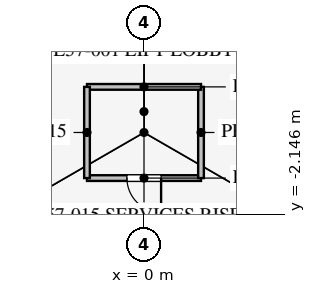
"""IFC4 building model, lengths in metres.
Left out: names, types, materials, properties, quantities, classifications, styles, units other than length and angle.
Written with IfcOpenShell. Run it as: python <this file> out.ifc"""

import sys

from ifc_helpers import new_model, si_unit, direction, frame, frame_2d, origin, place, context, subcontext, project, spatial, rectangle, extrude, element, fill, save


model = new_model("IFC4")
c1 = context("Model", 3, precision=1e-05, world=origin(), true_north=direction((0.0, 1.0)))
c2 = subcontext(c1, "Body", "Model", "MODEL_VIEW")
j1 = project(units=[si_unit("LENGTHUNIT", "METRE"), si_unit("PLANEANGLEUNIT", "RADIAN")], contexts=[c1])
p1 = place(None, origin())
s1 = spatial("IfcSite", under=j1, at=p1, CompositionType="ELEMENT")
p2 = place(p1, origin())
s2 = spatial("IfcBuilding", under=s1, at=p2, CompositionType="ELEMENT")
p3 = place(p2, frame((0.0, 0.0, 248.5)))
s3 = spatial("IfcBuildingStorey", under=s2, at=p3, CompositionType="ELEMENT", Elevation=248.5)
p4 = place(p3, frame((-1.5, -1.2, 0.0), z_axis=(0.0, 0.0, 1.0), x_axis=(1.0, 0.0, 0.0)))
e1 = element("IfcWall", 1, at=p4, inside=s3, PredefinedType="PARTITIONING", context=c2, shape_type="SweptSolid", body=[
    extrude(rectangle(XDim=3.0, YDim=0.15, at=frame_2d((1.5, 0.0))), origin(), (0.0, 0.0, 1.0), 4.0),
])
p5 = place(p4, frame((1.05, 0.0, 0.0)))
e2 = element("IfcOpeningElement", 2, at=p5, cuts=e1, PredefinedType="OPENING", context=c2, shape_type="SweptSolid", body=[
    extrude(rectangle(XDim=0.9, YDim=2.1, at=frame_2d((0.45, 1.05))), frame((0.0, 0.085, 0.0), z_axis=(0.0, -1.0, 0.0), x_axis=(1.0, 0.0, 0.0)), (0.0, 0.0, 1.0), 0.17),
])
p6 = place(p3, frame((1.5, -1.2, 0.0), z_axis=(0.0, 0.0, 1.0), x_axis=(0.0, 1.0, 0.0)))
e3 = element("IfcWall", 3, at=p6, inside=s3, PredefinedType="PARTITIONING", context=c2, shape_type="SweptSolid", body=[
    extrude(rectangle(XDim=2.4, YDim=0.15, at=frame_2d((1.2, 0.0))), origin(), (0.0, 0.0, 1.0), 4.0),
])
p7 = place(p3, frame((1.5, 1.2, 0.0), z_axis=(0.0, 0.0, 1.0), x_axis=(-1.0, 0.0, 0.0)))
e4 = element("IfcWall", 4, at=p7, inside=s3, PredefinedType="PARTITIONING", context=c2, shape_type="SweptSolid", body=[
    extrude(rectangle(XDim=3.0, YDim=0.15, at=frame_2d((1.5, 0.0))), origin(), (0.0, 0.0, 1.0), 4.0),
])
p8 = place(p3, frame((-1.5, 1.2, 0.0), z_axis=(0.0, 0.0, 1.0), x_axis=(0.0, -1.0, 0.0)))
e5 = element("IfcWall", 5, at=p8, inside=s3, PredefinedType="PARTITIONING", context=c2, shape_type="SweptSolid", body=[
    extrude(rectangle(XDim=2.4, YDim=0.15, at=frame_2d((1.2, 0.0))), origin(), (0.0, 0.0, 1.0), 4.0),
])
p9 = place(p5, frame((0.9, 0.0, 0.0), z_axis=(0.0, 0.0, 1.0), x_axis=(-1.0, 0.0, 0.0)))
e6 = element("IfcDoor", 6, at=p9, inside=s3, OperationType="SINGLE_SWING_LEFT", PredefinedType="DOOR", context=c2, shape_type="SweptSolid", body=[
    extrude(rectangle(XDim=0.9, YDim=2.1, at=frame_2d((0.45, 1.05))), frame((0.0, 0.025, 0.0), z_axis=(0.0, -1.0, 0.0), x_axis=(1.0, 0.0, 0.0)), (0.0, 0.0, 1.0), 0.05),
])
fill(e2, e6)
save(model, sys.argv[1])
